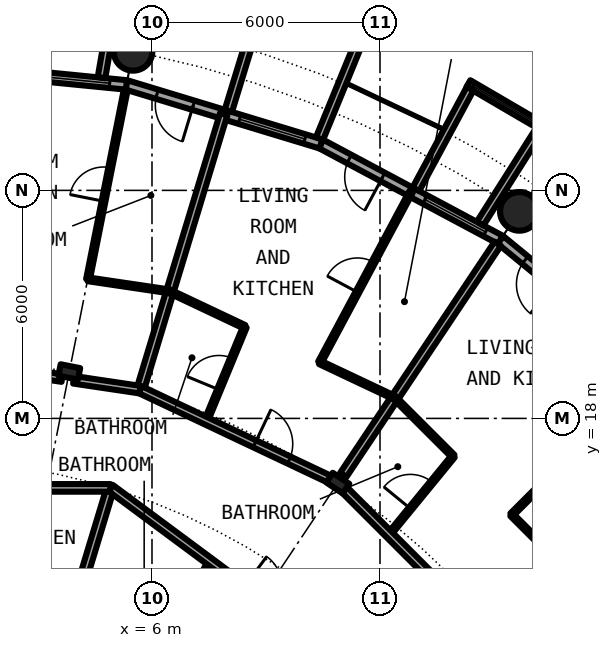
"""IFC4 building model, lengths in metres.
Left out: names, types, materials, properties, quantities, classifications, styles, units other than length and angle.
Written with IfcOpenShell. Run it as: python <this file> out.ifc"""

import sys

from ifc_helpers import new_model, si_unit, direction, frame, frame_2d, origin, origin_2d, place, context, subcontext, project, spatial, rectangle, circle, hollow_circle, i_section, extrude, element, fill, save


model = new_model("IFC4")
c1 = context("Model", 3, precision=1e-05, world=origin(), true_north=direction((0.0, 1.0)))
c2 = subcontext(c1, "Body", "Model", "MODEL_VIEW")
j1 = project(units=[si_unit("LENGTHUNIT", "METRE"), si_unit("PLANEANGLEUNIT", "RADIAN")], contexts=[c1])
p1 = place(None, origin())
s1 = spatial("IfcSite", under=j1, at=p1, CompositionType="ELEMENT")
p2 = place(p1, origin())
s2 = spatial("IfcBuilding", under=s1, at=p2, CompositionType="ELEMENT")
p3 = place(p2, frame((0.0, 0.0, 75.8)))
s3 = spatial("IfcBuildingStorey", under=s2, at=p3, CompositionType="ELEMENT", Elevation=75.8)
for number, where, z_axis, x_axis in (
    (1, (15.667, 23.448, 0.0), (0.0, 0.0, 1.0), (1.0, 0.0, 0.0)),
    (2, (5.501, 27.658, 0.0), (0.0, 0.0, 1.0), (1.0, 0.0, 0.0)),
):
    element("IfcColumn", number, at=place(p3, frame(where, z_axis=z_axis, x_axis=x_axis)), inside=s3, PredefinedType="COLUMN", context=c2, shape_type="SweptSolid", body=[
        extrude(hollow_circle(Radius=0.508, WallThickness=0.04, at=origin_2d()), origin(), (0.0, 0.0, 1.0), 3.05),
    ])
for number, where, z_axis, x_axis in (
    (3, (10.889, 16.297, 0.0), (0.0, 0.0, 1.0), (0.556, 0.831, 0.0)),
    (4, (3.824, 19.223, 0.0), (0.0, 0.0, 1.0), (0.195, 0.981, 0.0)),
):
    element("IfcColumn", number, at=place(p3, frame(where, z_axis=z_axis, x_axis=x_axis)), inside=s3, PredefinedType="COLUMN", context=c2, shape_type="SweptSolid", body=[
        extrude(i_section(OverallWidth=0.306, OverallDepth=0.524, WebThickness=0.021, FlangeThickness=0.04, FilletRadius=0.027, at=origin_2d()), origin(), (0.0, 0.0, 1.0), 3.05),
    ])
p4 = place(p3, frame((19.304, 19.304, 0.0), z_axis=(0.0, 0.0, 1.0), x_axis=(-0.773019449054, 0.634382322723, 0.0)))
e5 = element("IfcWall", 5, at=p4, inside=s3, PredefinedType="SOLIDWALL", context=c2, shape_type="SweptSolid", body=[
    extrude(rectangle(XDim=5.352, YDim=0.25, at=frame_2d((2.676, 0.0))), origin(), (0.0, 0.0, 1.0), 2.7),
])
p5 = place(p4, frame((0.441, 0.0, 0.3)))
e6 = element("IfcOpeningElement", 6, at=p5, cuts=e5, PredefinedType="OPENING", context=c2, shape_type="SweptSolid", body=[
    extrude(rectangle(XDim=1.8, YDim=2.1, at=frame_2d((0.9, 1.05))), frame((0.0, 0.135, 0.0), z_axis=(0.0, -1.0, 0.0), x_axis=(1.0, 0.0, 0.0)), (0.0, 0.0, 1.0), 0.27),
])
p6 = place(p4, frame((3.51, 0.0, 0.0)))
e7 = element("IfcOpeningElement", 7, at=p6, cuts=e5, PredefinedType="OPENING", context=c2, shape_type="SweptSolid", body=[
    extrude(rectangle(XDim=1.0, YDim=2.2, at=frame_2d((0.5, 1.1))), frame((0.0, 0.135, 0.0), z_axis=(0.0, -1.0, 0.0), x_axis=(1.0, 0.0, 0.0)), (0.0, 0.0, 1.0), 0.27),
])
p7 = place(p3, frame((15.167, 22.699, 0.0), z_axis=(0.0, 0.0, 1.0), x_axis=(-0.881915646801, 0.471407246368, 0.0)))
e8 = element("IfcWall", 8, at=p7, inside=s3, PredefinedType="SOLIDWALL", context=c2, shape_type="SweptSolid", body=[
    extrude(rectangle(XDim=5.352, YDim=0.25, at=frame_2d((2.676, 0.0))), origin(), (0.0, 0.0, 1.0), 2.7),
])
p8 = place(p7, frame((0.441, 0.0, 0.3)))
e9 = element("IfcOpeningElement", 9, at=p8, cuts=e8, PredefinedType="OPENING", context=c2, shape_type="SweptSolid", body=[
    extrude(rectangle(XDim=1.8, YDim=2.1, at=frame_2d((0.9, 1.05))), frame((0.0, 0.135, 0.0), z_axis=(0.0, -1.0, 0.0), x_axis=(1.0, 0.0, 0.0)), (0.0, 0.0, 1.0), 0.27),
])
p9 = place(p7, frame((3.51, 0.0, 0.0)))
e10 = element("IfcOpeningElement", 10, at=p9, cuts=e8, PredefinedType="OPENING", context=c2, shape_type="SweptSolid", body=[
    extrude(rectangle(XDim=1.0, YDim=2.2, at=frame_2d((0.5, 1.1))), frame((0.0, 0.135, 0.0), z_axis=(0.0, -1.0, 0.0), x_axis=(1.0, 0.0, 0.0)), (0.0, 0.0, 1.0), 0.27),
])
p10 = place(p3, frame((16.344, 25.633, -0.03), z_axis=(0.0, 0.0, 1.0), x_axis=(-0.863346521872, 0.504611517081, 0.0)))
e11 = element("IfcWall", 11, at=p10, inside=s3, PredefinedType="SOLIDWALL", context=c2, shape_type="SweptSolid", body=[
    extrude(rectangle(XDim=2.336, YDim=0.2, at=frame_2d((1.168, 0.0))), origin(), (0.0, 0.0, 1.0), 2.73),
])
p11 = place(p10, frame((0.128, 0.0, 0.33)))
e12 = element("IfcOpeningElement", 12, at=p11, cuts=e11, PredefinedType="OPENING", context=c2, shape_type="SweptSolid", body=[
    extrude(circle(Radius=1.04, at=frame_2d((1.04, 1.04))), frame((0.0, 0.11, 0.0), z_axis=(0.0, -1.0, 0.0), x_axis=(1.0, 0.0, 0.0)), (0.0, 0.0, 1.0), 0.22),
])
p12 = place(p3, frame((14.635, 23.126, -0.03), z_axis=(0.0, 0.0, 1.0), x_axis=(0.534437802731, 0.845207805816, 0.0)))
e13 = element("IfcWall", 13, at=p12, inside=s3, PredefinedType="SOLIDWALL", context=c2, shape_type="SweptSolid", body=[
    extrude(rectangle(XDim=2.932, YDim=0.2, at=frame_2d((1.466, 0.0))), origin(), (0.0, 0.0, 1.0), 2.73),
])
p13 = place(p3, frame((12.945, 24.029, -0.03), z_axis=(0.0, 0.0, 1.0), x_axis=(0.474424310775, 0.88029629861, 0.0)))
e14 = element("IfcWall", 14, at=p13, inside=s3, PredefinedType="SOLIDWALL", context=c2, shape_type="SweptSolid", body=[
    extrude(rectangle(XDim=3.006, YDim=0.2, at=frame_2d((1.503, 0.0))), origin(), (0.0, 0.0, 1.0), 2.73),
])
p14 = place(p3, frame((10.447, 25.222, 0.0), z_axis=(0.0, 0.0, 1.0), x_axis=(-0.956965678721, 0.290201119486, 0.0)))
e15 = element("IfcWall", 15, at=p14, inside=s3, PredefinedType="SOLIDWALL", context=c2, shape_type="SweptSolid", body=[
    extrude(rectangle(XDim=5.351, YDim=0.25, at=frame_2d((2.676, 0.0))), origin(), (0.0, 0.0, 1.0), 2.7),
])
p15 = place(p14, frame((0.441, 0.0, 0.3)))
e16 = element("IfcOpeningElement", 16, at=p15, cuts=e15, PredefinedType="OPENING", context=c2, shape_type="SweptSolid", body=[
    extrude(rectangle(XDim=1.8, YDim=2.1, at=frame_2d((0.9, 1.05))), frame((0.0, 0.135, 0.0), z_axis=(0.0, -1.0, 0.0), x_axis=(1.0, 0.0, 0.0)), (0.0, 0.0, 1.0), 0.27),
])
p16 = place(p14, frame((3.51, 0.0, 0.0)))
e17 = element("IfcOpeningElement", 17, at=p16, cuts=e15, PredefinedType="OPENING", context=c2, shape_type="SweptSolid", body=[
    extrude(rectangle(XDim=1.0, YDim=2.2, at=frame_2d((0.5, 1.1))), frame((0.0, 0.135, 0.0), z_axis=(0.0, -1.0, 0.0), x_axis=(1.0, 0.0, 0.0)), (0.0, 0.0, 1.0), 0.27),
])
p17 = place(p3, frame((10.409, 25.364, -0.03), z_axis=(0.0, 0.0, 1.0), x_axis=(0.379509886562, 0.925187681501, 0.0)))
e18 = element("IfcWall", 18, at=p17, inside=s3, PredefinedType="SOLIDWALL", context=c2, shape_type="SweptSolid", body=[
    extrude(rectangle(XDim=2.883, YDim=0.2, at=frame_2d((1.441, 0.0))), origin(), (0.0, 0.0, 1.0), 2.73),
])
p18 = place(p3, frame((8.009, 26.092, -0.03), z_axis=(0.0, 0.0, 1.0), x_axis=(0.293406695073, 0.955987715029, 0.0)))
e19 = element("IfcWall", 19, at=p18, inside=s3, PredefinedType="SOLIDWALL", context=c2, shape_type="SweptSolid", body=[
    extrude(rectangle(XDim=3.006, YDim=0.2, at=frame_2d((1.503, 0.0))), origin(), (0.0, 0.0, 1.0), 2.73),
])
p19 = place(p3, frame((5.326, 26.775, 0.0), z_axis=(0.0, 0.0, 1.0), x_axis=(-0.995173996315, 0.098126026407, 0.0)))
e20 = element("IfcWall", 20, at=p19, inside=s3, PredefinedType="SOLIDWALL", context=c2, shape_type="SweptSolid", body=[
    extrude(rectangle(XDim=5.352, YDim=0.25, at=frame_2d((2.676, 0.0))), origin(), (0.0, 0.0, 1.0), 2.7),
])
p20 = place(p19, frame((0.441, 0.0, 0.3)))
e21 = element("IfcOpeningElement", 21, at=p20, cuts=e20, PredefinedType="OPENING", context=c2, shape_type="SweptSolid", body=[
    extrude(rectangle(XDim=1.8, YDim=2.1, at=frame_2d((0.9, 1.05))), frame((0.0, 0.135, 0.0), z_axis=(0.0, -1.0, 0.0), x_axis=(1.0, 0.0, 0.0)), (0.0, 0.0, 1.0), 0.27),
])
p21 = place(p19, frame((3.51, 0.0, 0.0)))
e22 = element("IfcOpeningElement", 22, at=p21, cuts=e20, PredefinedType="OPENING", context=c2, shape_type="SweptSolid", body=[
    extrude(rectangle(XDim=1.0, YDim=2.2, at=frame_2d((0.5, 1.1))), frame((0.0, 0.135, 0.0), z_axis=(0.0, -1.0, 0.0), x_axis=(1.0, 0.0, 0.0)), (0.0, 0.0, 1.0), 0.27),
])
p22 = place(p3, frame((4.671, 26.966, -0.03), z_axis=(0.0, 0.0, 1.0), x_axis=(0.170539878907, 0.985350774954, 0.0)))
e23 = element("IfcWall", 23, at=p22, inside=s3, PredefinedType="SOLIDWALL", context=c2, shape_type="SweptSolid", body=[
    extrude(rectangle(XDim=2.932, YDim=0.2, at=frame_2d((1.466, 0.0))), origin(), (0.0, 0.0, 1.0), 2.73),
])
p23 = place(p3, frame((2.245, 7.387, 0.0), z_axis=(0.0, 0.0, 1.0), x_axis=(0.289977130626, 0.957033575019, 0.0)))
e24 = element("IfcWall", 24, at=p23, inside=s3, PredefinedType="PARTITIONING", context=c2, shape_type="SweptSolid", body=[
    extrude(rectangle(XDim=9.18, YDim=0.2, at=frame_2d((4.59, 0.0))), origin(), (0.0, 0.0, 1.0), 2.7),
])
p24 = place(p3, frame((5.69, 18.756, 0.0), z_axis=(0.0, 0.0, 1.0), x_axis=(0.29005838641, 0.957008951094, 0.0)))
e25 = element("IfcWall", 25, at=p24, inside=s3, PredefinedType="PARTITIONING", context=c2, shape_type="SweptSolid", body=[
    extrude(rectangle(XDim=7.574, YDim=0.2, at=frame_2d((3.787, 0.0))), origin(), (0.0, 0.0, 1.0), 2.7),
])
p25 = place(p3, frame((4.316, 21.66, 0.0), z_axis=(0.0, 0.0, 1.0), x_axis=(0.195350335681, 0.980733524638, 0.0)))
e26 = element("IfcWall", 26, at=p25, inside=s3, PredefinedType="PARTITIONING", context=c2, shape_type="SweptSolid", body=[
    extrude(rectangle(XDim=5.089, YDim=0.1, at=frame_2d((2.544, 0.0))), origin(), (0.0, 0.0, 1.0), 2.7),
])
p26 = place(p25, frame((2.095, 0.0, 0.0)))
e27 = element("IfcOpeningElement", 27, at=p26, cuts=e26, PredefinedType="OPENING", context=c2, shape_type="SweptSolid", body=[
    extrude(rectangle(XDim=0.9, YDim=2.3, at=frame_2d((0.45, 1.15))), frame((0.0, 0.06, 0.0), z_axis=(0.0, -1.0, 0.0), x_axis=(1.0, 0.0, 0.0)), (0.0, 0.0, 1.0), 0.12),
])
p27 = place(p3, frame((6.318, 11.96, 0.0), z_axis=(0.0, 0.0, 1.0), x_axis=(0.467001992543, 0.884256263173, 0.0)))
e28 = element("IfcWall", 28, at=p27, inside=s3, PredefinedType="PARTITIONING", context=c2, shape_type="SweptSolid", body=[
    extrude(rectangle(XDim=2.572, YDim=0.1, at=frame_2d((1.286, 0.0))), origin(), (0.0, 0.0, 1.0), 2.7),
])
p28 = place(p3, frame((7.423, 17.936, 0.0), z_axis=(0.0, 0.0, 1.0), x_axis=(0.382195876364, 0.924081334132, 0.0)))
e29 = element("IfcWall", 29, at=p28, inside=s3, PredefinedType="PARTITIONING", context=c2, shape_type="SweptSolid", body=[
    extrude(rectangle(XDim=2.674, YDim=0.1, at=frame_2d((1.337, 0.0))), origin(), (0.0, 0.0, 1.0), 2.7),
])
p29 = place(p28, frame((0.887, 0.0, 0.0)))
e30 = element("IfcOpeningElement", 30, at=p29, cuts=e29, PredefinedType="OPENING", context=c2, shape_type="SweptSolid", body=[
    extrude(rectangle(XDim=0.9, YDim=2.3, at=frame_2d((0.45, 1.15))), frame((0.0, 0.06, 0.0), z_axis=(0.0, -1.0, 0.0), x_axis=(1.0, 0.0, 0.0)), (0.0, 0.0, 1.0), 0.12),
])
p30 = place(p3, frame((10.417, 19.474, 0.0), z_axis=(0.0, 0.0, 1.0), x_axis=(0.471755462896, 0.881729427448, 0.0)))
e31 = element("IfcWall", 31, at=p30, inside=s3, PredefinedType="PARTITIONING", context=c2, shape_type="SweptSolid", body=[
    extrude(rectangle(XDim=5.09, YDim=0.1, at=frame_2d((2.545, 0.0))), origin(), (0.0, 0.0, 1.0), 2.7),
])
p31 = place(p30, frame((2.095, 0.0, 0.0)))
e32 = element("IfcOpeningElement", 32, at=p31, cuts=e31, PredefinedType="OPENING", context=c2, shape_type="SweptSolid", body=[
    extrude(rectangle(XDim=0.9, YDim=2.3, at=frame_2d((0.45, 1.15))), frame((0.0, 0.06, 0.0), z_axis=(0.0, -1.0, 0.0), x_axis=(1.0, 0.0, 0.0)), (0.0, 0.0, 1.0), 0.12),
])
p32 = place(p3, frame((11.035, 16.515, 0.0), z_axis=(0.0, 0.0, 1.0), x_axis=(0.555516661303, 0.831505405283, 0.0)))
e33 = element("IfcWall", 33, at=p32, inside=s3, PredefinedType="PARTITIONING", context=c2, shape_type="SweptSolid", body=[
    extrude(rectangle(XDim=7.312, YDim=0.2, at=frame_2d((3.656, 0.0))), origin(), (0.0, 0.0, 1.0), 2.7),
])
p33 = place(p3, frame((12.241, 14.945, 0.0), z_axis=(0.0, 0.0, 1.0), x_axis=(0.633582447834, 0.77367517848, 0.0)))
e34 = element("IfcWall", 34, at=p33, inside=s3, PredefinedType="PARTITIONING", context=c2, shape_type="SweptSolid", body=[
    extrude(rectangle(XDim=2.661, YDim=0.1, at=frame_2d((1.331, 0.0))), origin(), (0.0, 0.0, 1.0), 2.7),
])
p34 = place(p33, frame((0.881, 0.0, 0.0)))
e35 = element("IfcOpeningElement", 35, at=p34, cuts=e34, PredefinedType="OPENING", context=c2, shape_type="SweptSolid", body=[
    extrude(rectangle(XDim=0.9, YDim=2.3, at=frame_2d((0.45, 1.15))), frame((0.0, 0.06, 0.0), z_axis=(0.0, -1.0, 0.0), x_axis=(1.0, 0.0, 0.0)), (0.0, 0.0, 1.0), 0.12),
])
p35 = place(p3, frame((15.465, 15.465, 0.0), z_axis=(0.0, 0.0, 1.0), x_axis=(0.707106781187, 0.707106781187, 0.0)))
e36 = element("IfcWall", 36, at=p35, inside=s3, PredefinedType="PARTITIONING", context=c2, shape_type="SweptSolid", body=[
    extrude(rectangle(XDim=5.305, YDim=0.1, at=frame_2d((2.652, 0.0))), origin(), (0.0, 0.0, 1.0), 2.7),
])
p36 = place(p35, frame((2.202, 0.0, 0.0)))
e37 = element("IfcOpeningElement", 37, at=p36, cuts=e36, PredefinedType="OPENING", context=c2, shape_type="SweptSolid", body=[
    extrude(rectangle(XDim=0.9, YDim=2.3, at=frame_2d((0.45, 1.15))), frame((0.0, 0.06, 0.0), z_axis=(0.0, -1.0, 0.0), x_axis=(1.0, 0.0, 0.0)), (0.0, 0.0, 1.0), 0.12),
])
p37 = place(p3, frame((4.906, 16.172, 0.0), z_axis=(0.0, 0.0, 1.0), x_axis=(0.803191461888, -0.595720971219, 0.0)))
e38 = element("IfcWall", 38, at=p37, inside=s3, PredefinedType="PARTITIONING", context=c2, shape_type="SweptSolid", body=[
    extrude(rectangle(XDim=9.76, YDim=0.2, at=frame_2d((4.88, 0.0))), origin(), (0.0, 0.0, 1.0), 2.7),
])
p38 = place(p37, frame((4.38, 0.0, 0.0)))
e39 = element("IfcOpeningElement", 39, at=p38, cuts=e38, PredefinedType="OPENING", context=c2, shape_type="SweptSolid", body=[
    extrude(rectangle(XDim=1.0, YDim=2.3, at=frame_2d((0.5, 1.15))), frame((0.0, 0.11, 0.0), z_axis=(0.0, -1.0, 0.0), x_axis=(1.0, 0.0, 0.0)), (0.0, 0.0, 1.0), 0.22),
])
p39 = place(p3, frame((-4.906, 16.172, 0.0), z_axis=(0.0, 0.0, 1.0), x_axis=(1.0, 0.0, 0.0)))
e40 = element("IfcWall", 40, at=p39, inside=s3, PredefinedType="PARTITIONING", context=c2, shape_type="SweptSolid", body=[
    extrude(rectangle(XDim=9.812, YDim=0.2, at=frame_2d((4.906, 0.0))), origin(), (0.0, 0.0, 1.0), 2.7),
])
p40 = place(p39, frame((4.406, 0.0, 0.0)))
e41 = element("IfcOpeningElement", 41, at=p40, cuts=e40, PredefinedType="OPENING", context=c2, shape_type="SweptSolid", body=[
    extrude(rectangle(XDim=1.0, YDim=2.3, at=frame_2d((0.5, 1.15))), frame((0.0, 0.11, 0.0), z_axis=(0.0, -1.0, 0.0), x_axis=(1.0, 0.0, 0.0)), (0.0, 0.0, 1.0), 0.22),
])
p41 = place(p3, frame((11.0, 16.186, 0.0), z_axis=(0.0, 0.0, 1.0), x_axis=(0.707106781187, -0.707106781187, 0.0)))
e42 = element("IfcWall", 42, at=p41, inside=s3, PredefinedType="PARTITIONING", context=c2, shape_type="SweptSolid", body=[
    extrude(rectangle(XDim=7.334, YDim=0.2, at=frame_2d((3.667, 0.0))), origin(), (0.0, 0.0, 1.0), 2.38),
])
p42 = place(p41, frame((4.123, 0.0, 0.0)))
e43 = element("IfcOpeningElement", 43, at=p42, cuts=e42, PredefinedType="OPENING", context=c2, shape_type="SweptSolid", body=[
    extrude(rectangle(XDim=1.0, YDim=2.3, at=frame_2d((0.5, 1.15))), frame((0.0, 0.11, 0.0), z_axis=(0.0, -1.0, 0.0), x_axis=(1.0, 0.0, 0.0)), (0.0, 0.0, 1.0), 0.22),
])
p43 = place(p3, frame((0.0, 19.6, 0.0), z_axis=(0.0, 0.0, 1.0), x_axis=(0.989182049247, -0.146693126787, 0.0)))
e44 = element("IfcWall", 44, at=p43, inside=s3, PredefinedType="PARTITIONING", context=c2, shape_type="SweptSolid", body=[
    extrude(rectangle(XDim=3.675, YDim=0.2, at=frame_2d((1.837, 0.0))), origin(), (0.0, 0.0, 1.0), 2.38),
])
p44 = place(p43, frame((2.216, 0.0, 0.0)))
e45 = element("IfcOpeningElement", 45, at=p44, cuts=e44, PredefinedType="OPENING", context=c2, shape_type="SweptSolid", body=[
    extrude(rectangle(XDim=1.0, YDim=2.3, at=frame_2d((0.5, 1.15))), frame((0.0, 0.11, 0.0), z_axis=(0.0, -1.0, 0.0), x_axis=(1.0, 0.0, 0.0)), (0.0, 0.0, 1.0), 0.22),
])
p45 = place(p3, frame((3.939, 19.016, 0.0), z_axis=(0.0, 0.0, 1.0), x_axis=(0.989153791914, -0.146883545509, 0.0)))
e46 = element("IfcWall", 46, at=p45, inside=s3, PredefinedType="PARTITIONING", context=c2, shape_type="SweptSolid", body=[
    extrude(rectangle(XDim=1.77, YDim=0.2, at=frame_2d((0.885, 0.0))), origin(), (0.0, 0.0, 1.0), 2.38),
])
p46 = place(p3, frame((5.69, 18.756, 0.0), z_axis=(0.0, 0.0, 1.0), x_axis=(0.903901201372, -0.427741298169, 0.0)))
e47 = element("IfcWall", 47, at=p46, inside=s3, PredefinedType="PARTITIONING", context=c2, shape_type="SweptSolid", body=[
    extrude(rectangle(XDim=5.597, YDim=0.2, at=frame_2d((2.798, 0.0))), origin(), (0.0, 0.0, 1.0), 2.38),
])
p47 = place(p46, frame((3.334, 0.0, 0.0)))
e48 = element("IfcOpeningElement", 48, at=p47, cuts=e47, PredefinedType="OPENING", context=c2, shape_type="SweptSolid", body=[
    extrude(rectangle(XDim=1.0, YDim=2.3, at=frame_2d((0.5, 1.15))), frame((0.0, 0.11, 0.0), z_axis=(0.0, -1.0, 0.0), x_axis=(1.0, 0.0, 0.0)), (0.0, 0.0, 1.0), 0.22),
])
p48 = place(p3, frame((12.385, 18.544, 0.0), z_axis=(0.0, 0.0, 1.0), x_axis=(0.707387256653, -0.706826194425, 0.0)))
e49 = element("IfcWall", 49, at=p48, inside=s3, PredefinedType="PARTITIONING", context=c2, shape_type="SweptSolid", body=[
    extrude(rectangle(XDim=2.176, YDim=0.1, at=frame_2d((1.088, 0.0))), origin(), (0.0, 0.0, 1.0), 2.7),
])
p49 = place(p3, frame((15.465, 15.465, 0.0), z_axis=(0.0, 0.0, 1.0), x_axis=(0.707190945535, -0.707022606819, 0.0)))
e50 = element("IfcWall", 50, at=p49, inside=s3, PredefinedType="PARTITIONING", context=c2, shape_type="SweptSolid", body=[
    extrude(rectangle(XDim=4.351, YDim=0.1, at=frame_2d((2.175, 0.0))), origin(), (0.0, 0.0, 1.0), 2.7),
])
p50 = place(p49, frame((2.812, 0.0, 0.0)))
e51 = element("IfcOpeningElement", 51, at=p50, cuts=e50, PredefinedType="OPENING", context=c2, shape_type="SweptSolid", body=[
    extrude(rectangle(XDim=0.9, YDim=2.3, at=frame_2d((0.45, 1.15))), frame((0.0, 0.06, 0.0), z_axis=(0.0, -1.0, 0.0), x_axis=(1.0, 0.0, 0.0)), (0.0, 0.0, 1.0), 0.12),
])
p51 = place(p3, frame((4.315, 21.66, 0.0), z_axis=(0.0, 0.0, 1.0), x_axis=(0.989185420695, -0.146670390618, 0.0)))
e52 = element("IfcWall", 52, at=p51, inside=s3, PredefinedType="PARTITIONING", context=c2, shape_type="SweptSolid", body=[
    extrude(rectangle(XDim=2.181, YDim=0.1, at=frame_2d((1.09, 0.0))), origin(), (0.0, 0.0, 1.0), 2.7),
])
for number, where, z_axis, x_axis in (
    (53, (6.464, 21.342, 0.0), (0.0, 0.0, 1.0), (0.904, -0.427, 0.0)),
    (54, (10.417, 19.474, 0.0), (0.0, 0.0, 1.0), (0.904, -0.427, 0.0)),
):
    element("IfcWall", number, at=place(p3, frame(where, z_axis=z_axis, x_axis=x_axis)), inside=s3, PredefinedType="PARTITIONING", context=c2, shape_type="SweptSolid", body=[
        extrude(rectangle(XDim=2.181, YDim=0.1, at=frame_2d((1.091, 0.0))), origin(), (0.0, 0.0, 1.0), 2.7),
    ])
p52 = place(p6, origin())
e55 = element("IfcDoor", 55, at=p52, inside=s3, OperationType="SINGLE_SWING_LEFT", PredefinedType="DOOR", context=c2, shape_type="SweptSolid", body=[
    extrude(rectangle(XDim=1.0, YDim=2.2, at=frame_2d((0.5, 1.1))), frame((0.0, 0.025, 0.0), z_axis=(0.0, -1.0, 0.0), x_axis=(1.0, 0.0, 0.0)), (0.0, 0.0, 1.0), 0.05),
])
fill(e7, e55)
p53 = place(p8, origin())
e56 = element("IfcWindow", 56, at=p53, inside=s3, PartitioningType="SINGLE_PANEL", PredefinedType="WINDOW", context=c2, shape_type="SweptSolid", body=[
    extrude(rectangle(XDim=1.8, YDim=2.1, at=frame_2d((0.9, 1.05))), frame((0.0, 0.03, 0.0), z_axis=(0.0, -1.0, 0.0), x_axis=(1.0, 0.0, 0.0)), (0.0, 0.0, 1.0), 0.06),
])
fill(e9, e56)
p54 = place(p11, origin())
e57 = element("IfcWindow", 57, at=p54, inside=s3, PartitioningType="SINGLE_PANEL", PredefinedType="WINDOW", context=c2, shape_type="SweptSolid", body=[
    extrude(circle(Radius=1.04, at=frame_2d((1.04, 1.04))), frame((0.0, 0.03, 0.0), z_axis=(0.0, -1.0, 0.0), x_axis=(1.0, 0.0, 0.0)), (0.0, 0.0, 1.0), 0.06),
])
fill(e12, e57)
p55 = place(p9, origin())
e58 = element("IfcDoor", 58, at=p55, inside=s3, OperationType="SINGLE_SWING_LEFT", PredefinedType="DOOR", context=c2, shape_type="SweptSolid", body=[
    extrude(rectangle(XDim=1.0, YDim=2.2, at=frame_2d((0.5, 1.1))), frame((0.0, 0.025, 0.0), z_axis=(0.0, -1.0, 0.0), x_axis=(1.0, 0.0, 0.0)), (0.0, 0.0, 1.0), 0.05),
])
fill(e10, e58)
p56 = place(p15, origin())
e59 = element("IfcWindow", 59, at=p56, inside=s3, PartitioningType="SINGLE_PANEL", PredefinedType="WINDOW", context=c2, shape_type="SweptSolid", body=[
    extrude(rectangle(XDim=1.8, YDim=2.1, at=frame_2d((0.9, 1.05))), frame((0.0, 0.03, 0.0), z_axis=(0.0, -1.0, 0.0), x_axis=(1.0, 0.0, 0.0)), (0.0, 0.0, 1.0), 0.06),
])
fill(e16, e59)
p57 = place(p16, origin())
e60 = element("IfcDoor", 60, at=p57, inside=s3, OperationType="SINGLE_SWING_LEFT", PredefinedType="DOOR", context=c2, shape_type="SweptSolid", body=[
    extrude(rectangle(XDim=1.0, YDim=2.2, at=frame_2d((0.5, 1.1))), frame((0.0, 0.025, 0.0), z_axis=(0.0, -1.0, 0.0), x_axis=(1.0, 0.0, 0.0)), (0.0, 0.0, 1.0), 0.05),
])
fill(e17, e60)
p58 = place(p20, origin())
e61 = element("IfcWindow", 61, at=p58, inside=s3, PartitioningType="SINGLE_PANEL", PredefinedType="WINDOW", context=c2, shape_type="SweptSolid", body=[
    extrude(rectangle(XDim=1.8, YDim=2.1, at=frame_2d((0.9, 1.05))), frame((0.0, 0.03, 0.0), z_axis=(0.0, -1.0, 0.0), x_axis=(1.0, 0.0, 0.0)), (0.0, 0.0, 1.0), 0.06),
])
fill(e21, e61)
p59 = place(p34, origin())
e62 = element("IfcDoor", 62, at=p59, inside=s3, OperationType="SINGLE_SWING_LEFT", PredefinedType="DOOR", context=c2, shape_type="SweptSolid", body=[
    extrude(rectangle(XDim=0.9, YDim=2.3, at=frame_2d((0.45, 1.15))), frame((0.0, 0.025, 0.0), z_axis=(0.0, -1.0, 0.0), x_axis=(1.0, 0.0, 0.0)), (0.0, 0.0, 1.0), 0.05),
])
fill(e35, e62)
p60 = place(p47, origin())
e63 = element("IfcDoor", 63, at=p60, inside=s3, OperationType="SINGLE_SWING_RIGHT", PredefinedType="DOOR", context=c2, shape_type="SweptSolid", body=[
    extrude(rectangle(XDim=1.0, YDim=2.3, at=frame_2d((0.5, 1.15))), frame((0.0, 0.025, 0.0), z_axis=(0.0, -1.0, 0.0), x_axis=(1.0, 0.0, 0.0)), (0.0, 0.0, 1.0), 0.05),
])
fill(e48, e63)
p61 = place(p29, origin())
e64 = element("IfcDoor", 64, at=p61, inside=s3, OperationType="SINGLE_SWING_RIGHT", PredefinedType="DOOR", context=c2, shape_type="SweptSolid", body=[
    extrude(rectangle(XDim=0.9, YDim=2.3, at=frame_2d((0.45, 1.15))), frame((0.0, 0.025, 0.0), z_axis=(0.0, -1.0, 0.0), x_axis=(1.0, 0.0, 0.0)), (0.0, 0.0, 1.0), 0.05),
])
fill(e30, e64)
p62 = place(p31, origin())
e65 = element("IfcDoor", 65, at=p62, inside=s3, OperationType="SINGLE_SWING_LEFT", PredefinedType="DOOR", context=c2, shape_type="SweptSolid", body=[
    extrude(rectangle(XDim=0.9, YDim=2.3, at=frame_2d((0.45, 1.15))), frame((0.0, 0.025, 0.0), z_axis=(0.0, -1.0, 0.0), x_axis=(1.0, 0.0, 0.0)), (0.0, 0.0, 1.0), 0.05),
])
fill(e32, e65)
p63 = place(p26, origin())
e66 = element("IfcDoor", 66, at=p63, inside=s3, OperationType="SINGLE_SWING_RIGHT", PredefinedType="DOOR", context=c2, shape_type="SweptSolid", body=[
    extrude(rectangle(XDim=0.9, YDim=2.3, at=frame_2d((0.45, 1.15))), frame((0.0, 0.025, 0.0), z_axis=(0.0, -1.0, 0.0), x_axis=(1.0, 0.0, 0.0)), (0.0, 0.0, 1.0), 0.05),
])
fill(e27, e66)
save(model, sys.argv[1])
